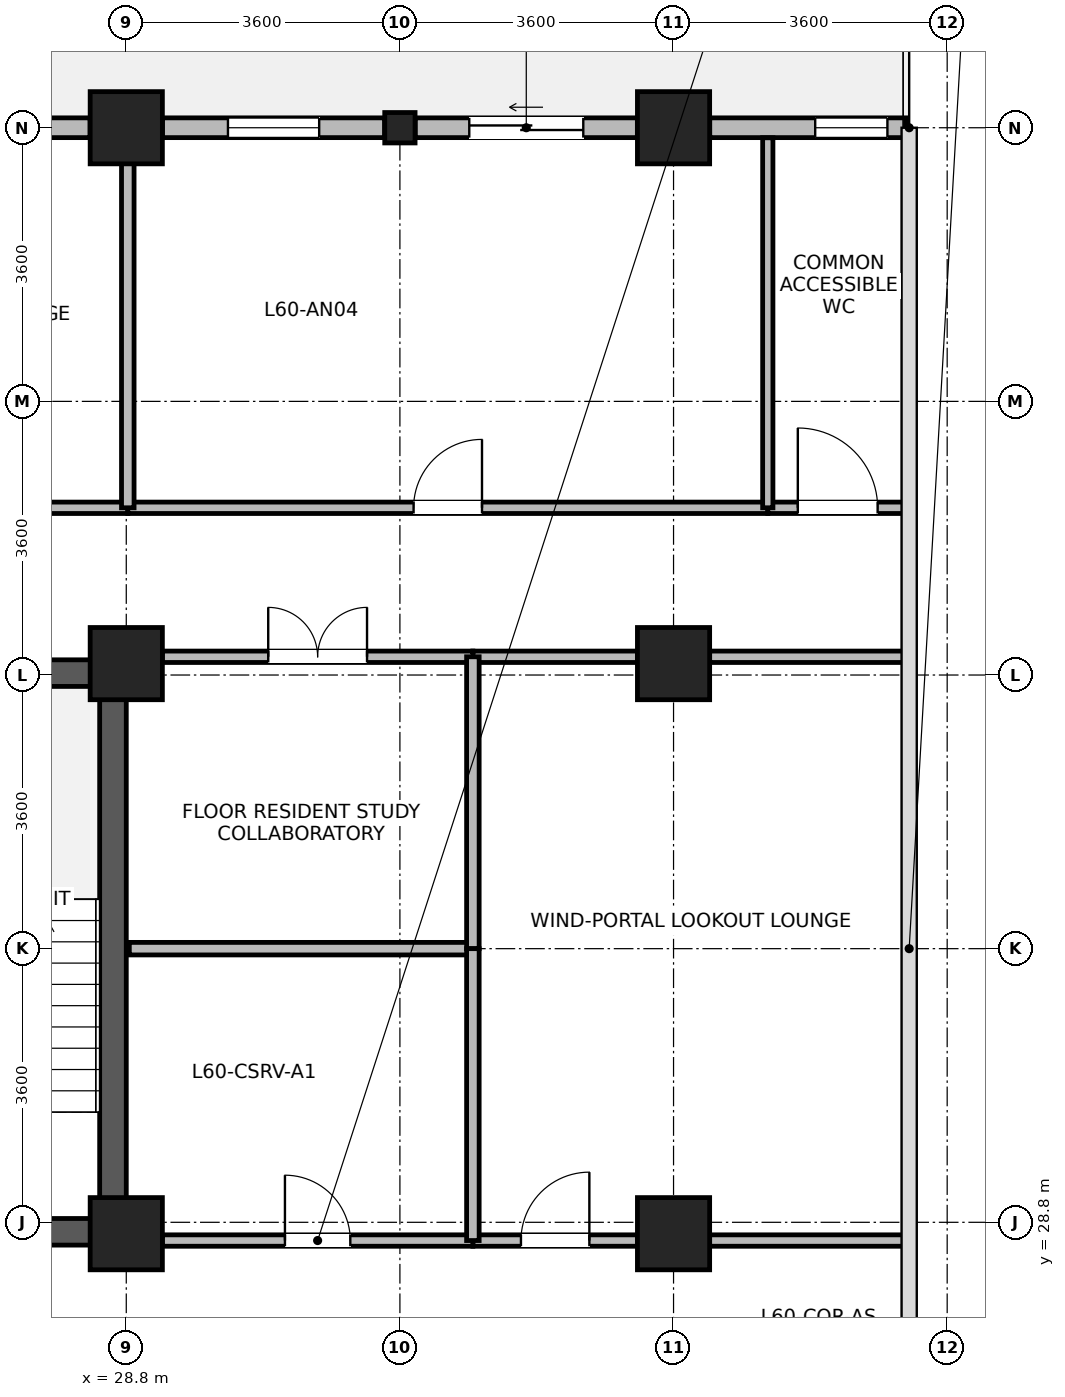
"""IFC4 building model, lengths in metres.
Left out: names, types, materials, properties, quantities, classifications, styles, units other than length and angle.
Written with IfcOpenShell. Run it as: python <this file> out.ifc"""

import sys

from ifc_helpers import new_model, si_unit, direction, frame, frame_2d, origin, origin_2d, place, context, subcontext, project, spatial, rectangle, i_section, extrude, source, transform, mapped, element, fill, save


model = new_model("IFC4")
c1 = context("Model", 3, precision=1e-05, world=origin(), true_north=direction((0.0, 1.0)))
c2 = subcontext(c1, "Body", "Model", "MODEL_VIEW")
j1 = project(units=[si_unit("LENGTHUNIT", "METRE"), si_unit("PLANEANGLEUNIT", "RADIAN")], contexts=[c1])
p1 = place(None, origin())
s1 = spatial("IfcSite", under=j1, at=p1, CompositionType="ELEMENT")
p2 = place(p1, origin())
s2 = spatial("IfcBuilding", under=s1, at=p2, CompositionType="ELEMENT")
p3 = place(p2, frame((0.0, 0.0, 235.1)))
s3 = spatial("IfcBuildingStorey", under=s2, at=p3, CompositionType="ELEMENT", Elevation=235.1)
p4 = place(p3, frame((28.625, 28.5, 0.0), z_axis=(0.0, 0.0, 1.0), x_axis=(0.0, 1.0, 0.0)))
e1 = element("IfcWall", 1, at=p4, inside=s3, PredefinedType="SHEAR", context=c2, shape_type="SweptSolid", body=[
    extrude(rectangle(XDim=7.7, YDim=0.35, at=frame_2d((3.85, 0.0))), origin(), (0.0, 0.0, 1.0), 3.44),
])
for number, where, z_axis, x_axis in (
    (2, (25.25, 28.675, 0.0), (0.0, 0.0, 1.0), (1.0, 0.0, 0.0)),
    (3, (25.25, 36.025, 0.0), (0.0, 0.0, 1.0), (1.0, 0.0, 0.0)),
):
    element("IfcWall", number, at=place(p3, frame(where, z_axis=z_axis, x_axis=x_axis)), inside=s3, PredefinedType="SHEAR", context=c2, shape_type="SweptSolid", body=[
        extrude(rectangle(XDim=3.2, YDim=0.35, at=frame_2d((1.6, 0.0))), origin(), (0.0, 0.0, 1.0), 3.44),
    ])
m1 = source(origin(), c2, "Body", "SweptSolid", [
    extrude(rectangle(XDim=0.95, YDim=0.95, at=origin_2d()), origin(), (0.0, 0.0, 1.0), 3.7),
])
for number, where, z_axis, x_axis in (
    (4, (28.8, 28.65, 0.0), (0.0, 0.0, 1.0), (1.0, 0.0, 0.0)),
    (5, (28.8, 36.15, 0.0), (0.0, 0.0, 1.0), (1.0, 0.0, 0.0)),
    (6, (28.8, 43.2, 0.0), (0.0, 0.0, 1.0), (1.0, 0.0, 0.0)),
    (7, (36.0, 43.2, 0.0), (0.0, 0.0, 1.0), (1.0, 0.0, 0.0)),
    (8, (36.0, 28.65, 0.0), (0.0, 0.0, 1.0), (1.0, 0.0, 0.0)),
    (9, (36.0, 36.15, 0.0), (0.0, 0.0, 1.0), (1.0, 0.0, 0.0)),
):
    element("IfcColumn", number, at=place(p3, frame(where, z_axis=z_axis, x_axis=x_axis)), inside=s3, PredefinedType="COLUMN", context=c2, shape_type="MappedRepresentation", body=[
        mapped(m1, transform((0.0, 0.0, 0.0), x_axis=(1.0, 0.0, 0.0), y_axis=(0.0, 1.0, 0.0), z_axis=(0.0, 0.0, 1.0), scale=1.0)),
    ])
m2 = source(origin(), c2, "Body", "SweptSolid", [
    extrude(i_section(OverallWidth=0.399, OverallDepth=0.4, WebThickness=0.017, FlangeThickness=0.023, FilletRadius=0.015, at=origin_2d()), origin(), (0.0, 0.0, 1.0), 3.7),
])
p5 = place(p3, frame((32.4, 43.2, 0.0), z_axis=(0.0, 0.0, 1.0), x_axis=(1.0, 0.0, 0.0)))
e10 = element("IfcColumn", 10, at=p5, inside=s3, PredefinedType="COLUMN", context=c2, shape_type="MappedRepresentation", body=[
    mapped(m2, transform((0.0, 0.0, 0.0), x_axis=(1.0, 0.0, 0.0), y_axis=(0.0, 1.0, 0.0), z_axis=(0.0, 0.0, 1.0), scale=1.0)),
])
p6 = place(p3, frame((36.476, 43.2, 0.0), z_axis=(0.0, 0.0, 1.0), x_axis=(1.0, 0.0, 0.0)))
e11 = element("IfcWall", 11, at=p6, inside=s3, PredefinedType="STANDARD", context=c2, shape_type="SweptSolid", body=[
    extrude(rectangle(XDim=2.587, YDim=0.26, at=frame_2d((1.293, 0.0))), origin(), (0.0, 0.0, 1.0), 3.42),
])
p7 = place(p6, frame((1.388, 0.0, 0.85)))
e12 = element("IfcOpeningElement", 12, at=p7, cuts=e11, PredefinedType="OPENING", context=c2, shape_type="SweptSolid", body=[
    extrude(rectangle(XDim=0.95, YDim=1.75, at=frame_2d((0.475, 0.875))), frame((0.0, 0.14, 0.0), z_axis=(0.0, -1.0, 0.0), x_axis=(1.0, 0.0, 0.0)), (0.0, 0.0, 1.0), 0.28),
])
p8 = place(p3, frame((32.601, 43.2, 0.0), z_axis=(0.0, 0.0, 1.0), x_axis=(1.0, 0.0, 0.0)))
e13 = element("IfcWall", 13, at=p8, inside=s3, PredefinedType="STANDARD", context=c2, shape_type="SweptSolid", body=[
    extrude(rectangle(XDim=2.923, YDim=0.26, at=frame_2d((1.462, 0.0))), origin(), (0.0, 0.0, 1.0), 3.02),
])
p9 = place(p8, frame((0.712, 0.0, 0.0)))
e14 = element("IfcOpeningElement", 14, at=p9, cuts=e13, PredefinedType="OPENING", context=c2, shape_type="SweptSolid", body=[
    extrude(rectangle(XDim=1.5, YDim=2.15, at=frame_2d((0.75, 1.075))), frame((0.0, 0.14, 0.0), z_axis=(0.0, -1.0, 0.0), x_axis=(1.0, 0.0, 0.0)), (0.0, 0.0, 1.0), 0.28),
])
p10 = place(p3, frame((29.276, 43.2, 0.0), z_axis=(0.0, 0.0, 1.0), x_axis=(1.0, 0.0, 0.0)))
e15 = element("IfcWall", 15, at=p10, inside=s3, PredefinedType="STANDARD", context=c2, shape_type="SweptSolid", body=[
    extrude(rectangle(XDim=2.924, YDim=0.26, at=frame_2d((1.462, 0.0))), origin(), (0.0, 0.0, 1.0), 3.02),
])
p11 = place(p10, frame((0.862, 0.0, 0.85)))
e16 = element("IfcOpeningElement", 16, at=p11, cuts=e15, PredefinedType="OPENING", context=c2, shape_type="SweptSolid", body=[
    extrude(rectangle(XDim=1.2, YDim=1.75, at=frame_2d((0.6, 0.875))), frame((0.0, 0.14, 0.0), z_axis=(0.0, -1.0, 0.0), x_axis=(1.0, 0.0, 0.0)), (0.0, 0.0, 1.0), 0.28),
])
p12 = place(p3, frame((25.4, 43.2, 0.0), z_axis=(0.0, 0.0, 1.0), x_axis=(1.0, 0.0, 0.0)))
e17 = element("IfcWall", 17, at=p12, inside=s3, PredefinedType="STANDARD", context=c2, shape_type="SweptSolid", body=[
    extrude(rectangle(XDim=2.924, YDim=0.26, at=frame_2d((1.462, 0.0))), origin(), (0.0, 0.0, 1.0), 3.02),
])
p13 = place(p12, frame((0.862, 0.0, 0.85)))
e18 = element("IfcOpeningElement", 18, at=p13, cuts=e17, PredefinedType="OPENING", context=c2, shape_type="SweptSolid", body=[
    extrude(rectangle(XDim=1.2, YDim=1.75, at=frame_2d((0.6, 0.875))), frame((0.0, 0.14, 0.0), z_axis=(0.0, -1.0, 0.0), x_axis=(1.0, 0.0, 0.0)), (0.0, 0.0, 1.0), 0.28),
])
p14 = place(p3, frame((19.64, 38.2, 0.0), z_axis=(0.0, 0.0, 1.0), x_axis=(1.0, 0.0, 0.0)))
e19 = element("IfcWall", 19, at=p14, inside=s3, PredefinedType="PARTITIONING", context=c2, shape_type="SweptSolid", body=[
    extrude(rectangle(XDim=9.18, YDim=0.15, at=frame_2d((4.59, 0.0))), origin(), (0.0, 0.0, 1.0), 3.42),
])
p15 = place(p14, frame((3.94, 0.0, 0.0)))
e20 = element("IfcOpeningElement", 20, at=p15, cuts=e19, PredefinedType="OPENING", context=c2, shape_type="SweptSolid", body=[
    extrude(rectangle(XDim=1.3, YDim=2.12, at=frame_2d((0.65, 1.06))), frame((0.0, 0.085, 0.0), z_axis=(0.0, -1.0, 0.0), x_axis=(1.0, 0.0, 0.0)), (0.0, 0.0, 1.0), 0.17),
])
p16 = place(p3, frame((28.82, 38.2, 0.0), z_axis=(0.0, 0.0, 1.0), x_axis=(1.0, 0.0, 0.0)))
e21 = element("IfcWall", 21, at=p16, inside=s3, PredefinedType="PARTITIONING", context=c2, shape_type="SweptSolid", body=[
    extrude(rectangle(XDim=8.42, YDim=0.15, at=frame_2d((4.21, 0.0))), origin(), (0.0, 0.0, 1.0), 3.42),
])
p17 = place(p16, frame((3.76, 0.0, 0.0)))
e22 = element("IfcOpeningElement", 22, at=p17, cuts=e21, PredefinedType="OPENING", context=c2, shape_type="SweptSolid", body=[
    extrude(rectangle(XDim=0.9, YDim=2.08, at=frame_2d((0.45, 1.04))), frame((0.0, 0.085, 0.0), z_axis=(0.0, -1.0, 0.0), x_axis=(1.0, 0.0, 0.0)), (0.0, 0.0, 1.0), 0.17),
])
p18 = place(p3, frame((33.36, 28.56, 0.0), z_axis=(0.0, 0.0, 1.0), x_axis=(1.0, 0.0, 0.0)))
e23 = element("IfcWall", 23, at=p18, inside=s3, PredefinedType="PARTITIONING", context=c2, shape_type="SweptSolid", body=[
    extrude(rectangle(XDim=2.165, YDim=0.15, at=frame_2d((1.083, 0.0))), origin(), (0.0, 0.0, 1.0), 2.87),
])
p19 = place(p18, frame((0.633, 0.0, 0.0)))
e24 = element("IfcOpeningElement", 24, at=p19, cuts=e23, PredefinedType="OPENING", context=c2, shape_type="SweptSolid", body=[
    extrude(rectangle(XDim=0.9, YDim=2.08, at=frame_2d((0.45, 1.04))), frame((0.0, 0.085, 0.0), z_axis=(0.0, -1.0, 0.0), x_axis=(1.0, 0.0, 0.0)), (0.0, 0.0, 1.0), 0.17),
])
p20 = place(p3, frame((36.475, 28.56, 0.0), z_axis=(0.0, 0.0, 1.0), x_axis=(1.0, 0.0, 0.0)))
e25 = element("IfcWall", 25, at=p20, inside=s3, PredefinedType="PARTITIONING", context=c2, shape_type="SweptSolid", body=[
    extrude(rectangle(XDim=2.605, YDim=0.15, at=frame_2d((1.302, 0.0))), origin(), (0.0, 0.0, 1.0), 3.42),
])
p21 = place(p3, frame((33.36, 36.24, 0.0), z_axis=(0.0, 0.0, 1.0), x_axis=(1.0, 0.0, 0.0)))
e26 = element("IfcWall", 26, at=p21, inside=s3, PredefinedType="PARTITIONING", context=c2, shape_type="SweptSolid", body=[
    extrude(rectangle(XDim=2.165, YDim=0.15, at=frame_2d((1.083, 0.0))), origin(), (0.0, 0.0, 1.0), 2.87),
])
p22 = place(p3, frame((36.475, 36.24, 0.0), z_axis=(0.0, 0.0, 1.0), x_axis=(1.0, 0.0, 0.0)))
e27 = element("IfcWall", 27, at=p22, inside=s3, PredefinedType="PARTITIONING", context=c2, shape_type="SweptSolid", body=[
    extrude(rectangle(XDim=2.605, YDim=0.15, at=frame_2d((1.302, 0.0))), origin(), (0.0, 0.0, 1.0), 3.42),
])
p23 = place(p3, frame((29.275, 28.56, 0.0), z_axis=(0.0, 0.0, 1.0), x_axis=(1.0, 0.0, 0.0)))
e28 = element("IfcWall", 28, at=p23, inside=s3, PredefinedType="PARTITIONING", context=c2, shape_type="SweptSolid", body=[
    extrude(rectangle(XDim=4.085, YDim=0.15, at=frame_2d((2.042, 0.0))), origin(), (0.0, 0.0, 1.0), 2.87),
])
p24 = place(p23, frame((1.613, 0.0, 0.0)))
e29 = element("IfcOpeningElement", 29, at=p24, cuts=e28, PredefinedType="OPENING", context=c2, shape_type="SweptSolid", body=[
    extrude(rectangle(XDim=0.86, YDim=2.02, at=frame_2d((0.43, 1.01))), frame((0.0, 0.085, 0.0), z_axis=(0.0, -1.0, 0.0), x_axis=(1.0, 0.0, 0.0)), (0.0, 0.0, 1.0), 0.17),
])
p25 = place(p3, frame((29.275, 36.24, 0.0), z_axis=(0.0, 0.0, 1.0), x_axis=(1.0, 0.0, 0.0)))
e30 = element("IfcWall", 30, at=p25, inside=s3, PredefinedType="PARTITIONING", context=c2, shape_type="SweptSolid", body=[
    extrude(rectangle(XDim=4.085, YDim=0.15, at=frame_2d((2.042, 0.0))), origin(), (0.0, 0.0, 1.0), 2.87),
])
p26 = place(p25, frame((1.393, 0.0, 0.0)))
e31 = element("IfcOpeningElement", 31, at=p26, cuts=e30, PredefinedType="OPENING", context=c2, shape_type="SweptSolid", body=[
    extrude(rectangle(XDim=1.3, YDim=2.12, at=frame_2d((0.65, 1.06))), frame((0.0, 0.085, 0.0), z_axis=(0.0, -1.0, 0.0), x_axis=(1.0, 0.0, 0.0)), (0.0, 0.0, 1.0), 0.17),
])
p27 = place(p3, frame((37.24, 38.2, 0.0), z_axis=(0.0, 0.0, 1.0), x_axis=(1.0, 0.0, 0.0)))
e32 = element("IfcWall", 32, at=p27, inside=s3, PredefinedType="PARTITIONING", context=c2, shape_type="SweptSolid", body=[
    extrude(rectangle(XDim=1.84, YDim=0.15, at=frame_2d((0.92, 0.0))), origin(), (0.0, 0.0, 1.0), 3.42),
])
p28 = place(p27, frame((0.395, 0.0, 0.0)))
e33 = element("IfcOpeningElement", 33, at=p28, cuts=e32, PredefinedType="OPENING", context=c2, shape_type="SweptSolid", body=[
    extrude(rectangle(XDim=1.05, YDim=2.12, at=frame_2d((0.525, 1.06))), frame((0.0, 0.085, 0.0), z_axis=(0.0, -1.0, 0.0), x_axis=(1.0, 0.0, 0.0)), (0.0, 0.0, 1.0), 0.17),
])
p29 = place(p3, frame((28.82, 38.2, 0.0), z_axis=(0.0, 0.0, 1.0), x_axis=(0.0, 1.0, 0.0)))
e34 = element("IfcWall", 34, at=p29, inside=s3, PredefinedType="PARTITIONING", context=c2, shape_type="SweptSolid", body=[
    extrude(rectangle(XDim=4.868, YDim=0.165, at=frame_2d((2.434, 0.0))), origin(), (0.0, 0.0, 1.0), 2.97),
])
p30 = place(p3, frame((37.24, 38.2, 0.0), z_axis=(0.0, 0.0, 1.0), x_axis=(0.0, 1.0, 0.0)))
e35 = element("IfcWall", 35, at=p30, inside=s3, PredefinedType="PARTITIONING", context=c2, shape_type="SweptSolid", body=[
    extrude(rectangle(XDim=4.868, YDim=0.135, at=frame_2d((2.434, 0.0))), origin(), (0.0, 0.0, 1.0), 3.42),
])
p31 = place(p3, frame((28.84, 32.4, 0.0), z_axis=(0.0, 0.0, 1.0), x_axis=(1.0, 0.0, 0.0)))
e36 = element("IfcWall", 36, at=p31, inside=s3, PredefinedType="PARTITIONING", context=c2, shape_type="SweptSolid", body=[
    extrude(rectangle(XDim=4.52, YDim=0.165, at=frame_2d((2.26, 0.0))), origin(), (0.0, 0.0, 1.0), 3.42),
])
p32 = place(p3, frame((33.36, 32.4, 0.0), z_axis=(0.0, 0.0, 1.0), x_axis=(0.0, 1.0, 0.0)))
e37 = element("IfcWall", 37, at=p32, inside=s3, PredefinedType="PARTITIONING", context=c2, shape_type="SweptSolid", body=[
    extrude(rectangle(XDim=3.84, YDim=0.165, at=frame_2d((1.92, 0.0))), origin(), (0.0, 0.0, 1.0), 3.42),
])
p33 = place(p3, frame((33.36, 28.56, 0.0), z_axis=(0.0, 0.0, 1.0), x_axis=(0.0, 1.0, 0.0)))
e38 = element("IfcWall", 38, at=p33, inside=s3, PredefinedType="PARTITIONING", context=c2, shape_type="SweptSolid", body=[
    extrude(rectangle(XDim=3.84, YDim=0.165, at=frame_2d((1.92, 0.0))), origin(), (0.0, 0.0, 1.0), 3.42),
])
p34 = place(p7, origin())
e39 = element("IfcWindow", 39, at=p34, inside=s3, PartitioningType="SINGLE_PANEL", PredefinedType="WINDOW", context=c2, shape_type="SweptSolid", body=[
    extrude(rectangle(XDim=0.95, YDim=1.75, at=frame_2d((0.475, 0.875))), frame((0.0, 0.03, 0.0), z_axis=(0.0, -1.0, 0.0), x_axis=(1.0, 0.0, 0.0)), (0.0, 0.0, 1.0), 0.06),
])
fill(e12, e39)
p35 = place(p9, origin())
e40 = element("IfcDoor", 40, at=p35, inside=s3, OperationType="SLIDING_TO_LEFT", PredefinedType="DOOR", context=c2, shape_type="SweptSolid", body=[
    extrude(rectangle(XDim=1.5, YDim=2.15, at=frame_2d((0.75, 1.075))), frame((0.0, 0.025, 0.0), z_axis=(0.0, -1.0, 0.0), x_axis=(1.0, 0.0, 0.0)), (0.0, 0.0, 1.0), 0.05),
])
fill(e14, e40)
p36 = place(p11, origin())
e41 = element("IfcWindow", 41, at=p36, inside=s3, PartitioningType="SINGLE_PANEL", PredefinedType="WINDOW", context=c2, shape_type="SweptSolid", body=[
    extrude(rectangle(XDim=1.2, YDim=1.75, at=frame_2d((0.6, 0.875))), frame((0.0, 0.03, 0.0), z_axis=(0.0, -1.0, 0.0), x_axis=(1.0, 0.0, 0.0)), (0.0, 0.0, 1.0), 0.06),
])
fill(e16, e41)
p37 = place(p17, origin())
e42 = element("IfcDoor", 42, at=p37, inside=s3, OperationType="SINGLE_SWING_RIGHT", PredefinedType="DOOR", context=c2, shape_type="SweptSolid", body=[
    extrude(rectangle(XDim=0.9, YDim=2.08, at=frame_2d((0.45, 1.04))), frame((0.0, 0.025, 0.0), z_axis=(0.0, -1.0, 0.0), x_axis=(1.0, 0.0, 0.0)), (0.0, 0.0, 1.0), 0.05),
])
fill(e22, e42)
p38 = place(p19, origin())
e43 = element("IfcDoor", 43, at=p38, inside=s3, OperationType="SINGLE_SWING_RIGHT", PredefinedType="DOOR", context=c2, shape_type="SweptSolid", body=[
    extrude(rectangle(XDim=0.9, YDim=2.08, at=frame_2d((0.45, 1.04))), frame((0.0, 0.025, 0.0), z_axis=(0.0, -1.0, 0.0), x_axis=(1.0, 0.0, 0.0)), (0.0, 0.0, 1.0), 0.05),
])
fill(e24, e43)
p39 = place(p24, origin())
e44 = element("IfcDoor", 44, at=p39, inside=s3, OperationType="SINGLE_SWING_LEFT", PredefinedType="DOOR", context=c2, shape_type="SweptSolid", body=[
    extrude(rectangle(XDim=0.86, YDim=2.02, at=frame_2d((0.43, 1.01))), frame((0.0, 0.025, 0.0), z_axis=(0.0, -1.0, 0.0), x_axis=(1.0, 0.0, 0.0)), (0.0, 0.0, 1.0), 0.05),
])
fill(e29, e44)
p40 = place(p26, origin())
e45 = element("IfcDoor", 45, at=p40, inside=s3, OperationType="DOUBLE_DOOR_SINGLE_SWING", PredefinedType="DOOR", context=c2, shape_type="SweptSolid", body=[
    extrude(rectangle(XDim=1.3, YDim=2.12, at=frame_2d((0.65, 1.06))), frame((0.0, 0.025, 0.0), z_axis=(0.0, -1.0, 0.0), x_axis=(1.0, 0.0, 0.0)), (0.0, 0.0, 1.0), 0.05),
])
fill(e31, e45)
p41 = place(p28, origin())
e46 = element("IfcDoor", 46, at=p41, inside=s3, OperationType="SINGLE_SWING_LEFT", PredefinedType="DOOR", context=c2, shape_type="SweptSolid", body=[
    extrude(rectangle(XDim=1.05, YDim=2.12, at=frame_2d((0.525, 1.06))), frame((0.0, 0.025, 0.0), z_axis=(0.0, -1.0, 0.0), x_axis=(1.0, 0.0, 0.0)), (0.0, 0.0, 1.0), 0.05),
])
fill(e33, e46)
save(model, sys.argv[1])
